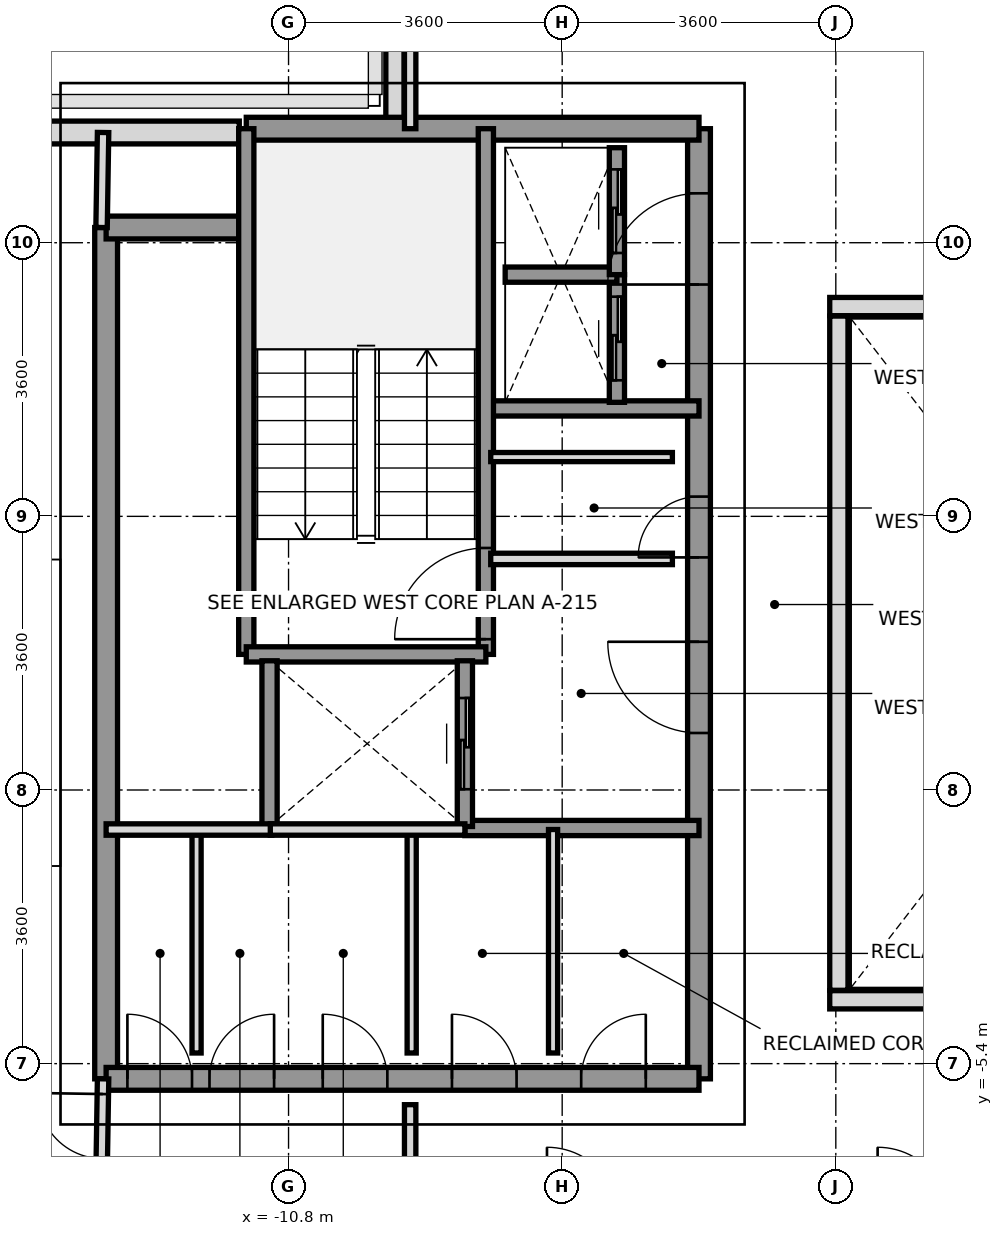
"""IFC4 building model, lengths in metres.
Left out: names, types, materials, properties, quantities, classifications, styles, units other than length and angle.
Written with IfcOpenShell. Run it as: python <this file> out.ifc"""

import sys

from ifc_helpers import new_model, si_unit, direction, frame, frame_2d, origin, place, context, subcontext, project, spatial, rectangle, extrude, source, transform, mapped, element, fill, save


model = new_model("IFC4")
c1 = context("Model", 3, precision=1e-05, world=origin(), true_north=direction((0.0, 1.0)))
c2 = subcontext(c1, "Body", "Model", "MODEL_VIEW")
j1 = project(units=[si_unit("LENGTHUNIT", "METRE"), si_unit("PLANEANGLEUNIT", "RADIAN")], contexts=[c1])
p1 = place(None, origin())
s1 = spatial("IfcSite", under=j1, at=p1, CompositionType="ELEMENT")
p2 = place(p1, origin())
s2 = spatial("IfcBuilding", under=s1, at=p2, CompositionType="ELEMENT")
p3 = place(p2, frame((0.0, 0.0, 223.6)))
s3 = spatial("IfcBuildingStorey", under=s2, at=p3, CompositionType="ELEMENT", Elevation=223.6)
p4 = place(p3, frame((-14.133, 6.85, 0.0), z_axis=(0.0, 0.0, 1.0), x_axis=(1.0, 0.0, 0.0)))
e1 = element("IfcWall", 1, at=p4, inside=s3, PredefinedType="SOLIDWALL", context=c2, shape_type="SweptSolid", body=[
    extrude(rectangle(XDim=2.685, YDim=0.3, at=frame_2d((1.343, 0.0))), origin(), (0.0, 0.0, 1.0), 2.57),
])
p5 = place(p3, frame((-9.4, 6.953, 0.0), z_axis=(0.0, 0.0, 1.0), x_axis=(0.0, 1.0, 0.0)))
e2 = element("IfcWall", 2, at=p5, inside=s3, PredefinedType="PARAPET", context=c2, shape_type="SweptSolid", body=[
    extrude(rectangle(XDim=1.669, YDim=0.24, at=frame_2d((0.834, 0.0))), origin(), (0.0, 0.0, 1.0), 1.15),
])
p6 = place(p3, frame((-13.2, -5.6, 0.0), z_axis=(0.0, 0.0, 1.0), x_axis=(0.0, 1.0, 0.0)))
e3 = element("IfcWall", 3, at=p6, inside=s3, PredefinedType="SHEAR", context=c2, shape_type="SweptSolid", body=[
    extrude(rectangle(XDim=11.2, YDim=0.3, at=frame_2d((5.6, 0.0))), origin(), (0.0, 0.0, 1.0), 3.01),
])
p7 = place(p3, frame((-5.4, -5.6, 0.0), z_axis=(0.0, 0.0, 1.0), x_axis=(0.0, 1.0, 0.0)))
e4 = element("IfcWall", 4, at=p7, inside=s3, PredefinedType="SHEAR", context=c2, shape_type="SweptSolid", body=[
    extrude(rectangle(XDim=12.5, YDim=0.3, at=frame_2d((6.25, 0.0))), origin(), (0.0, 0.0, 1.0), 3.01),
])
p8 = place(p7, frame((4.55, 0.0, 0.0)))
e5 = element("IfcOpeningElement", 5, at=p8, cuts=e4, PredefinedType="OPENING", context=c2, shape_type="SweptSolid", body=[
    extrude(rectangle(XDim=1.2, YDim=2.2, at=frame_2d((0.6, 1.1))), frame((0.0, 0.16, 0.0), z_axis=(0.0, -1.0, 0.0), x_axis=(1.0, 0.0, 0.0)), (0.0, 0.0, 1.0), 0.32),
])
p9 = place(p7, frame((10.45, 0.0, 0.0)))
e6 = element("IfcOpeningElement", 6, at=p9, cuts=e4, PredefinedType="OPENING", context=c2, shape_type="SweptSolid", body=[
    extrude(rectangle(XDim=1.2, YDim=2.2, at=frame_2d((0.6, 1.1))), frame((0.0, 0.16, 0.0), z_axis=(0.0, -1.0, 0.0), x_axis=(1.0, 0.0, 0.0)), (0.0, 0.0, 1.0), 0.32),
])
p10 = place(p7, frame((6.86, 0.0, 0.0)))
e7 = element("IfcOpeningElement", 7, at=p10, cuts=e4, PredefinedType="OPENING", context=c2, shape_type="SweptSolid", body=[
    extrude(rectangle(XDim=0.8, YDim=2.1, at=frame_2d((0.4, 1.05))), frame((0.0, 0.16, 0.0), z_axis=(0.0, -1.0, 0.0), x_axis=(1.0, 0.0, 0.0)), (0.0, 0.0, 1.0), 0.32),
])
p11 = place(p3, frame((-11.356, 6.9, 0.0), z_axis=(0.0, 0.0, 1.0), x_axis=(1.0, 0.0, 0.0)))
e8 = element("IfcWall", 8, at=p11, inside=s3, PredefinedType="SHEAR", context=c2, shape_type="SweptSolid", body=[
    extrude(rectangle(XDim=5.956, YDim=0.3, at=frame_2d((2.978, 0.0))), origin(), (0.0, 0.0, 1.0), 3.01),
])
p12 = place(p3, frame((-13.2, 5.6, 0.0), z_axis=(0.0, 0.0, 1.0), x_axis=(1.0, 0.0, 0.0)))
e9 = element("IfcWall", 9, at=p12, inside=s3, PredefinedType="SHEAR", context=c2, shape_type="SweptSolid", body=[
    extrude(rectangle(XDim=1.844, YDim=0.3, at=frame_2d((0.922, 0.0))), origin(), (0.0, 0.0, 1.0), 3.01),
])
p13 = place(p3, frame((-13.2, -5.6, 0.0), z_axis=(0.0, 0.0, 1.0), x_axis=(1.0, 0.0, 0.0)))
e10 = element("IfcWall", 10, at=p13, inside=s3, PredefinedType="SHEAR", context=c2, shape_type="SweptSolid", body=[
    extrude(rectangle(XDim=7.8, YDim=0.3, at=frame_2d((3.9, 0.0))), origin(), (0.0, 0.0, 1.0), 3.01),
])
p14 = place(p13, frame((0.28, 0.0, 0.0)))
e11 = element("IfcOpeningElement", 11, at=p14, cuts=e10, PredefinedType="OPENING", context=c2, shape_type="SweptSolid", body=[
    extrude(rectangle(XDim=0.85, YDim=2.1, at=frame_2d((0.425, 1.05))), frame((0.0, 0.16, 0.0), z_axis=(0.0, -1.0, 0.0), x_axis=(1.0, 0.0, 0.0)), (0.0, 0.0, 1.0), 0.32),
])
p15 = place(p13, frame((1.36, 0.0, 0.0)))
e12 = element("IfcOpeningElement", 12, at=p15, cuts=e10, PredefinedType="OPENING", context=c2, shape_type="SweptSolid", body=[
    extrude(rectangle(XDim=0.85, YDim=2.1, at=frame_2d((0.425, 1.05))), frame((0.0, 0.16, 0.0), z_axis=(0.0, -1.0, 0.0), x_axis=(1.0, 0.0, 0.0)), (0.0, 0.0, 1.0), 0.32),
])
p16 = place(p13, frame((2.85, 0.0, 0.0)))
e13 = element("IfcOpeningElement", 13, at=p16, cuts=e10, PredefinedType="OPENING", context=c2, shape_type="SweptSolid", body=[
    extrude(rectangle(XDim=0.85, YDim=2.1, at=frame_2d((0.425, 1.05))), frame((0.0, 0.16, 0.0), z_axis=(0.0, -1.0, 0.0), x_axis=(1.0, 0.0, 0.0)), (0.0, 0.0, 1.0), 0.32),
])
p17 = place(p13, frame((4.55, 0.0, 0.0)))
e14 = element("IfcOpeningElement", 14, at=p17, cuts=e10, PredefinedType="OPENING", context=c2, shape_type="SweptSolid", body=[
    extrude(rectangle(XDim=0.85, YDim=2.1, at=frame_2d((0.425, 1.05))), frame((0.0, 0.16, 0.0), z_axis=(0.0, -1.0, 0.0), x_axis=(1.0, 0.0, 0.0)), (0.0, 0.0, 1.0), 0.32),
])
p18 = place(p13, frame((6.25, 0.0, 0.0)))
e15 = element("IfcOpeningElement", 15, at=p18, cuts=e10, PredefinedType="OPENING", context=c2, shape_type="SweptSolid", body=[
    extrude(rectangle(XDim=0.85, YDim=2.1, at=frame_2d((0.425, 1.05))), frame((0.0, 0.16, 0.0), z_axis=(0.0, -1.0, 0.0), x_axis=(1.0, 0.0, 0.0)), (0.0, 0.0, 1.0), 0.32),
])
p19 = place(p3, frame((-8.18, 3.22, 0.0), z_axis=(0.0, 0.0, 1.0), x_axis=(1.0, 0.0, 0.0)))
e16 = element("IfcWall", 16, at=p19, inside=s3, PredefinedType="SOLIDWALL", context=c2, shape_type="SweptSolid", body=[
    extrude(rectangle(XDim=2.78, YDim=0.2, at=frame_2d((1.39, 0.0))), origin(), (0.0, 0.0, 1.0), 3.01),
])
p20 = place(p3, frame((-8.48, -2.3, 0.0), z_axis=(0.0, 0.0, 1.0), x_axis=(1.0, 0.0, 0.0)))
e17 = element("IfcWall", 17, at=p20, inside=s3, PredefinedType="SOLIDWALL", context=c2, shape_type="SweptSolid", body=[
    extrude(rectangle(XDim=3.08, YDim=0.2, at=frame_2d((1.54, 0.0))), origin(), (0.0, 0.0, 1.0), 3.01),
])
p21 = place(p3, frame((-8.204, -0.016, 0.0), z_axis=(0.0, 0.0, 1.0), x_axis=(0.0, 1.0, 0.0)))
e18 = element("IfcWall", 18, at=p21, inside=s3, PredefinedType="SOLIDWALL", context=c2, shape_type="SweptSolid", body=[
    extrude(rectangle(XDim=6.916, YDim=0.2, at=frame_2d((3.458, 0.0))), origin(), (0.0, 0.0, 1.0), 3.01),
])
p22 = place(p21, frame((0.2, 0.0, 0.0)))
e19 = element("IfcOpeningElement", 19, at=p22, cuts=e18, PredefinedType="OPENING", context=c2, shape_type="SweptSolid", body=[
    extrude(rectangle(XDim=1.2, YDim=2.2, at=frame_2d((0.6, 1.1))), frame((0.0, 0.11, 0.0), z_axis=(0.0, -1.0, 0.0), x_axis=(1.0, 0.0, 0.0)), (0.0, 0.0, 1.0), 0.22),
])
p23 = place(p3, frame((-11.356, -0.016, 0.0), z_axis=(0.0, 0.0, 1.0), x_axis=(0.0, 1.0, 0.0)))
e20 = element("IfcWall", 20, at=p23, inside=s3, PredefinedType="SOLIDWALL", context=c2, shape_type="SweptSolid", body=[
    extrude(rectangle(XDim=6.916, YDim=0.2, at=frame_2d((3.458, 0.0))), origin(), (0.0, 0.0, 1.0), 3.01),
])
p24 = place(p3, frame((-11.356, -0.016, 0.0), z_axis=(0.0, 0.0, 1.0), x_axis=(1.0, 0.0, 0.0)))
e21 = element("IfcWall", 21, at=p24, inside=s3, PredefinedType="SOLIDWALL", context=c2, shape_type="SweptSolid", body=[
    extrude(rectangle(XDim=3.152, YDim=0.2, at=frame_2d((1.576, 0.0))), origin(), (0.0, 0.0, 1.0), 3.01),
])
p25 = place(p3, frame((-11.05, -2.28, 0.0), z_axis=(0.0, 0.0, 1.0), x_axis=(0.0, 1.0, 0.0)))
e22 = element("IfcWall", 22, at=p25, inside=s3, PredefinedType="SOLIDWALL", context=c2, shape_type="SweptSolid", body=[
    extrude(rectangle(XDim=2.18, YDim=0.2, at=frame_2d((1.09, 0.0))), origin(), (0.0, 0.0, 1.0), 3.01),
])
p26 = place(p3, frame((-8.48, -2.28, 0.0), z_axis=(0.0, 0.0, 1.0), x_axis=(0.0, 1.0, 0.0)))
e23 = element("IfcWall", 23, at=p26, inside=s3, PredefinedType="SOLIDWALL", context=c2, shape_type="SweptSolid", body=[
    extrude(rectangle(XDim=2.18, YDim=0.2, at=frame_2d((1.09, 0.0))), origin(), (0.0, 0.0, 1.0), 3.01),
])
p27 = place(p26, frame((0.49, 0.0, 0.0)))
e24 = element("IfcOpeningElement", 24, at=p27, cuts=e23, PredefinedType="OPENING", context=c2, shape_type="SweptSolid", body=[
    extrude(rectangle(XDim=1.2, YDim=2.2, at=frame_2d((0.6, 1.1))), frame((0.0, 0.11, 0.0), z_axis=(0.0, -1.0, 0.0), x_axis=(1.0, 0.0, 0.0)), (0.0, 0.0, 1.0), 0.22),
])
p28 = place(p3, frame((-6.48, 3.3, 0.0), z_axis=(0.0, 0.0, 1.0), x_axis=(0.0, 1.0, 0.0)))
e25 = element("IfcWall", 25, at=p28, inside=s3, PredefinedType="SOLIDWALL", context=c2, shape_type="SweptSolid", body=[
    extrude(rectangle(XDim=1.68, YDim=0.2, at=frame_2d((0.84, 0.0))), origin(), (0.0, 0.0, 1.0), 3.01),
])
p29 = place(p28, frame((0.29, 0.0, 0.0)))
e26 = element("IfcOpeningElement", 26, at=p29, cuts=e25, PredefinedType="OPENING", context=c2, shape_type="SweptSolid", body=[
    extrude(rectangle(XDim=1.1, YDim=2.2, at=frame_2d((0.55, 1.1))), frame((0.0, 0.11, 0.0), z_axis=(0.0, -1.0, 0.0), x_axis=(1.0, 0.0, 0.0)), (0.0, 0.0, 1.0), 0.22),
])
p30 = place(p3, frame((-7.95, 4.98, 0.0), z_axis=(0.0, 0.0, 1.0), x_axis=(1.0, 0.0, 0.0)))
e27 = element("IfcWall", 27, at=p30, inside=s3, PredefinedType="SOLIDWALL", context=c2, shape_type="SweptSolid", body=[
    extrude(rectangle(XDim=1.47, YDim=0.2, at=frame_2d((0.735, 0.0))), origin(), (0.0, 0.0, 1.0), 3.01),
])
p31 = place(p3, frame((-6.48, 4.98, 0.0), z_axis=(0.0, 0.0, 1.0), x_axis=(0.0, 1.0, 0.0)))
e28 = element("IfcWall", 28, at=p31, inside=s3, PredefinedType="SOLIDWALL", context=c2, shape_type="SweptSolid", body=[
    extrude(rectangle(XDim=1.67, YDim=0.2, at=frame_2d((0.835, 0.0))), origin(), (0.0, 0.0, 1.0), 3.01),
])
p32 = place(p31, frame((0.285, 0.0, 0.0)))
e29 = element("IfcOpeningElement", 29, at=p32, cuts=e28, PredefinedType="OPENING", context=c2, shape_type="SweptSolid", body=[
    extrude(rectangle(XDim=1.1, YDim=2.2, at=frame_2d((0.55, 1.1))), frame((0.0, 0.11, 0.0), z_axis=(0.0, -1.0, 0.0), x_axis=(1.0, 0.0, 0.0)), (0.0, 0.0, 1.0), 0.22),
])
p33 = place(p3, frame((-8.14, 1.24, 0.0), z_axis=(0.0, 0.0, 1.0), x_axis=(1.0, 0.0, 0.0)))
e30 = element("IfcWall", 30, at=p33, inside=s3, PredefinedType="PARTITIONING", context=c2, shape_type="SweptSolid", body=[
    extrude(rectangle(XDim=2.39, YDim=0.15, at=frame_2d((1.195, 0.0))), origin(), (0.0, 0.0, 1.0), 3.01),
])
p34 = place(p3, frame((-8.14, 2.58, 0.0), z_axis=(0.0, 0.0, 1.0), x_axis=(1.0, 0.0, 0.0)))
e31 = element("IfcWall", 31, at=p34, inside=s3, PredefinedType="PARTITIONING", context=c2, shape_type="SweptSolid", body=[
    extrude(rectangle(XDim=2.39, YDim=0.12, at=frame_2d((1.195, 0.0))), origin(), (0.0, 0.0, 1.0), 3.01),
])
p35 = place(p3, frame((-12.01, -5.26, 0.0), z_axis=(0.0, 0.0, 1.0), x_axis=(0.0, 1.0, 0.0)))
e32 = element("IfcWall", 32, at=p35, inside=s3, PredefinedType="PARTITIONING", context=c2, shape_type="SweptSolid", body=[
    extrude(rectangle(XDim=2.94, YDim=0.12, at=frame_2d((1.47, 0.0))), origin(), (0.0, 0.0, 1.0), 3.01),
])
p36 = place(p3, frame((-13.2, -2.32, 0.0), z_axis=(0.0, 0.0, 1.0), x_axis=(1.0, 0.0, 0.0)))
e33 = element("IfcWall", 33, at=p36, inside=s3, PredefinedType="PARTITIONING", context=c2, shape_type="SweptSolid", body=[
    extrude(rectangle(XDim=2.18, YDim=0.15, at=frame_2d((1.09, 0.0))), origin(), (0.0, 0.0, 1.0), 3.01),
])
for number, where, z_axis, x_axis in (
    (34, (-9.18, -5.26, 0.0), (0.0, 0.0, 1.0), (0.0, 1.0, 0.0)),
    (35, (-7.32, -5.26, 0.0), (0.0, 0.0, 1.0), (0.0, 1.0, 0.0)),
):
    element("IfcWall", number, at=place(p3, frame(where, z_axis=z_axis, x_axis=x_axis)), inside=s3, PredefinedType="PARTITIONING", context=c2, shape_type="SweptSolid", body=[
        extrude(rectangle(XDim=2.94, YDim=0.12, at=frame_2d((1.47, 0.0))), origin(), (0.0, 0.0, 1.0), 3.01),
    ])
p37 = place(p3, frame((-11.04, -2.32, 0.0), z_axis=(0.0, 0.0, 1.0), x_axis=(1.0, 0.0, 0.0)))
e36 = element("IfcWall", 36, at=p37, inside=s3, PredefinedType="PARTITIONING", context=c2, shape_type="SweptSolid", body=[
    extrude(rectangle(XDim=2.56, YDim=0.15, at=frame_2d((1.28, 0.0))), origin(), (0.0, 0.0, 1.0), 3.01),
])
p38 = place(p3, frame((-9.2, 6.9, 0.0), z_axis=(0.0, 0.0, 1.0), x_axis=(0.0, 1.0, 0.0)))
e37 = element("IfcWall", 37, at=p38, inside=s3, PredefinedType="PARTITIONING", context=c2, shape_type="SweptSolid", body=[
    extrude(rectangle(XDim=3.38, YDim=0.15, at=frame_2d((1.69, 0.0))), origin(), (0.0, 0.0, 1.0), 2.61),
])
p39 = place(p3, frame((-9.2, -10.28, 0.0), z_axis=(0.0, 0.0, 1.0), x_axis=(0.0, 1.0, 0.0)))
e38 = element("IfcWall", 38, at=p39, inside=s3, PredefinedType="PARTITIONING", context=c2, shape_type="SweptSolid", body=[
    extrude(rectangle(XDim=4.34, YDim=0.15, at=frame_2d((2.17, 0.0))), origin(), (0.0, 0.0, 1.0), 2.61),
])
p40 = place(p3, frame((-13.26, 5.6, 0.0), z_axis=(0.0, 0.0, 1.0), x_axis=(0.016013571389, 0.999871774545, 0.0)))
e39 = element("IfcWall", 39, at=p40, inside=s3, PredefinedType="PARTITIONING", context=c2, shape_type="SweptSolid", body=[
    extrude(rectangle(XDim=1.25, YDim=0.15, at=frame_2d((0.625, 0.0))), origin(), (0.0, 0.0, 1.0), 3.01),
])
p41 = place(p3, frame((-13.26, -6.85, 0.0), z_axis=(0.0, 0.0, 1.0), x_axis=(0.016013571389, 0.999871774545, 0.0)))
e40 = element("IfcWall", 40, at=p41, inside=s3, PredefinedType="PARTITIONING", context=c2, shape_type="SweptSolid", body=[
    extrude(rectangle(XDim=1.25, YDim=0.15, at=frame_2d((0.625, 0.0))), origin(), (0.0, 0.0, 1.0), 3.01),
])
p42 = place(p41, frame((0.2, 0.0, 0.0)))
e41 = element("IfcOpeningElement", 41, at=p42, cuts=e40, PredefinedType="OPENING", context=c2, shape_type="SweptSolid", body=[
    extrude(rectangle(XDim=0.85, YDim=2.1, at=frame_2d((0.425, 1.05))), frame((0.0, 0.085, 0.0), z_axis=(0.0, -1.0, 0.0), x_axis=(1.0, 0.0, 0.0)), (0.0, 0.0, 1.0), 0.17),
])
for number, where, z_axis, x_axis in (
    (42, (-3.68, -4.56, 0.0), (0.0, 0.0, 1.0), (1.0, 0.0, 0.0)),
    (43, (-3.68, 4.56, 0.0), (0.0, 0.0, 1.0), (1.0, 0.0, 0.0)),
):
    element("IfcWall", number, at=place(p3, frame(where, z_axis=z_axis, x_axis=x_axis)), inside=s3, PredefinedType="PARAPET", context=c2, shape_type="SweptSolid", body=[
        extrude(rectangle(XDim=7.36, YDim=0.24, at=frame_2d((3.68, 0.0))), origin(), (0.0, 0.0, 1.0), 1.15),
    ])
p43 = place(p3, frame((-3.56, -4.435, 0.0), z_axis=(0.0, 0.0, 1.0), x_axis=(0.0, 1.0, 0.0)))
e44 = element("IfcWall", 44, at=p43, inside=s3, PredefinedType="PARAPET", context=c2, shape_type="SweptSolid", body=[
    extrude(rectangle(XDim=8.87, YDim=0.24, at=frame_2d((4.435, 0.0))), origin(), (0.0, 0.0, 1.0), 1.15),
])
m1 = source(origin(), c2, "Body", "SweptSolid", [
    extrude(rectangle(XDim=1.2, YDim=2.2, at=frame_2d((0.6, 1.1))), frame((0.0, 0.025, 0.0), z_axis=(0.0, -1.0, 0.0), x_axis=(1.0, 0.0, 0.0)), (0.0, 0.0, 1.0), 0.05),
])
p44 = place(p22, origin())
e45 = element("IfcDoor", 45, at=p44, inside=s3, OperationType="SINGLE_SWING_LEFT", PredefinedType="DOOR", context=c2, shape_type="MappedRepresentation", body=[
    mapped(m1, transform((0.0, 0.0, 0.0), x_axis=(1.0, 0.0, 0.0), y_axis=(0.0, 1.0, 0.0), z_axis=(0.0, 0.0, 1.0), scale=1.0)),
])
fill(e19, e45)
p45 = place(p8, origin())
e46 = element("IfcDoor", 46, at=p45, inside=s3, OperationType="SINGLE_SWING_RIGHT", PredefinedType="DOOR", context=c2, shape_type="MappedRepresentation", body=[
    mapped(m1, transform((0.0, 0.0, 0.0), x_axis=(1.0, 0.0, 0.0), y_axis=(0.0, 1.0, 0.0), z_axis=(0.0, 0.0, 1.0), scale=1.0)),
])
fill(e5, e46)
p46 = place(p9, origin())
e47 = element("IfcDoor", 47, at=p46, inside=s3, OperationType="SINGLE_SWING_LEFT", PredefinedType="DOOR", context=c2, shape_type="MappedRepresentation", body=[
    mapped(m1, transform((0.0, 0.0, 0.0), x_axis=(1.0, 0.0, 0.0), y_axis=(0.0, 1.0, 0.0), z_axis=(0.0, 0.0, 1.0), scale=1.0)),
])
fill(e6, e47)
m2 = source(origin(), c2, "Body", "SweptSolid", [
    extrude(rectangle(XDim=0.8, YDim=2.1, at=frame_2d((0.4, 1.05))), frame((0.0, 0.025, 0.0), z_axis=(0.0, -1.0, 0.0), x_axis=(1.0, 0.0, 0.0)), (0.0, 0.0, 1.0), 0.05),
])
p47 = place(p10, origin())
e48 = element("IfcDoor", 48, at=p47, inside=s3, OperationType="SINGLE_SWING_LEFT", PredefinedType="DOOR", context=c2, shape_type="MappedRepresentation", body=[
    mapped(m2, transform((0.0, 0.0, 0.0), x_axis=(1.0, 0.0, 0.0), y_axis=(0.0, 1.0, 0.0), z_axis=(0.0, 0.0, 1.0), scale=1.0)),
])
fill(e7, e48)
m3 = source(origin(), c2, "Body", "SweptSolid", [
    extrude(rectangle(XDim=0.85, YDim=2.1, at=frame_2d((0.425, 1.05))), frame((0.0, 0.025, 0.0), z_axis=(0.0, -1.0, 0.0), x_axis=(1.0, 0.0, 0.0)), (0.0, 0.0, 1.0), 0.05),
])
p48 = place(p14, origin())
e49 = element("IfcDoor", 49, at=p48, inside=s3, OperationType="SINGLE_SWING_LEFT", PredefinedType="DOOR", context=c2, shape_type="MappedRepresentation", body=[
    mapped(m3, transform((0.0, 0.0, 0.0), x_axis=(1.0, 0.0, 0.0), y_axis=(0.0, 1.0, 0.0), z_axis=(0.0, 0.0, 1.0), scale=1.0)),
])
fill(e11, e49)
p49 = place(p15, origin())
e50 = element("IfcDoor", 50, at=p49, inside=s3, OperationType="SINGLE_SWING_RIGHT", PredefinedType="DOOR", context=c2, shape_type="MappedRepresentation", body=[
    mapped(m3, transform((0.0, 0.0, 0.0), x_axis=(1.0, 0.0, 0.0), y_axis=(0.0, 1.0, 0.0), z_axis=(0.0, 0.0, 1.0), scale=1.0)),
])
fill(e12, e50)
p50 = place(p16, origin())
e51 = element("IfcDoor", 51, at=p50, inside=s3, OperationType="SINGLE_SWING_LEFT", PredefinedType="DOOR", context=c2, shape_type="MappedRepresentation", body=[
    mapped(m3, transform((0.0, 0.0, 0.0), x_axis=(1.0, 0.0, 0.0), y_axis=(0.0, 1.0, 0.0), z_axis=(0.0, 0.0, 1.0), scale=1.0)),
])
fill(e13, e51)
p51 = place(p17, origin())
e52 = element("IfcDoor", 52, at=p51, inside=s3, OperationType="SINGLE_SWING_LEFT", PredefinedType="DOOR", context=c2, shape_type="MappedRepresentation", body=[
    mapped(m3, transform((0.0, 0.0, 0.0), x_axis=(1.0, 0.0, 0.0), y_axis=(0.0, 1.0, 0.0), z_axis=(0.0, 0.0, 1.0), scale=1.0)),
])
fill(e14, e52)
p52 = place(p18, origin())
e53 = element("IfcDoor", 53, at=p52, inside=s3, OperationType="SINGLE_SWING_RIGHT", PredefinedType="DOOR", context=c2, shape_type="MappedRepresentation", body=[
    mapped(m3, transform((0.0, 0.0, 0.0), x_axis=(1.0, 0.0, 0.0), y_axis=(0.0, 1.0, 0.0), z_axis=(0.0, 0.0, 1.0), scale=1.0)),
])
fill(e15, e53)
p53 = place(p27, origin())
e54 = element("IfcDoor", 54, at=p53, inside=s3, OperationType="SLIDING_TO_RIGHT", PredefinedType="DOOR", context=c2, shape_type="MappedRepresentation", body=[
    mapped(m1, transform((0.0, 0.0, 0.0), x_axis=(1.0, 0.0, 0.0), y_axis=(0.0, 1.0, 0.0), z_axis=(0.0, 0.0, 1.0), scale=1.0)),
])
fill(e24, e54)
m4 = source(origin(), c2, "Body", "SweptSolid", [
    extrude(rectangle(XDim=1.1, YDim=2.2, at=frame_2d((0.55, 1.1))), frame((0.0, 0.025, 0.0), z_axis=(0.0, -1.0, 0.0), x_axis=(1.0, 0.0, 0.0)), (0.0, 0.0, 1.0), 0.05),
])
p54 = place(p29, origin())
e55 = element("IfcDoor", 55, at=p54, inside=s3, OperationType="SLIDING_TO_LEFT", PredefinedType="DOOR", context=c2, shape_type="MappedRepresentation", body=[
    mapped(m4, transform((0.0, 0.0, 0.0), x_axis=(1.0, 0.0, 0.0), y_axis=(0.0, 1.0, 0.0), z_axis=(0.0, 0.0, 1.0), scale=1.0)),
])
fill(e26, e55)
p55 = place(p32, origin())
e56 = element("IfcDoor", 56, at=p55, inside=s3, OperationType="SLIDING_TO_LEFT", PredefinedType="DOOR", context=c2, shape_type="MappedRepresentation", body=[
    mapped(m4, transform((0.0, 0.0, 0.0), x_axis=(1.0, 0.0, 0.0), y_axis=(0.0, 1.0, 0.0), z_axis=(0.0, 0.0, 1.0), scale=1.0)),
])
fill(e29, e56)
p56 = place(p42, origin())
e57 = element("IfcDoor", 57, at=p56, inside=s3, OperationType="SINGLE_SWING_RIGHT", PredefinedType="DOOR", context=c2, shape_type="MappedRepresentation", body=[
    mapped(m3, transform((0.0, 0.0, 0.0), x_axis=(1.0, 0.0, 0.0), y_axis=(0.0, 1.0, 0.0), z_axis=(0.0, 0.0, 1.0), scale=1.0)),
])
fill(e41, e57)
save(model, sys.argv[1])
